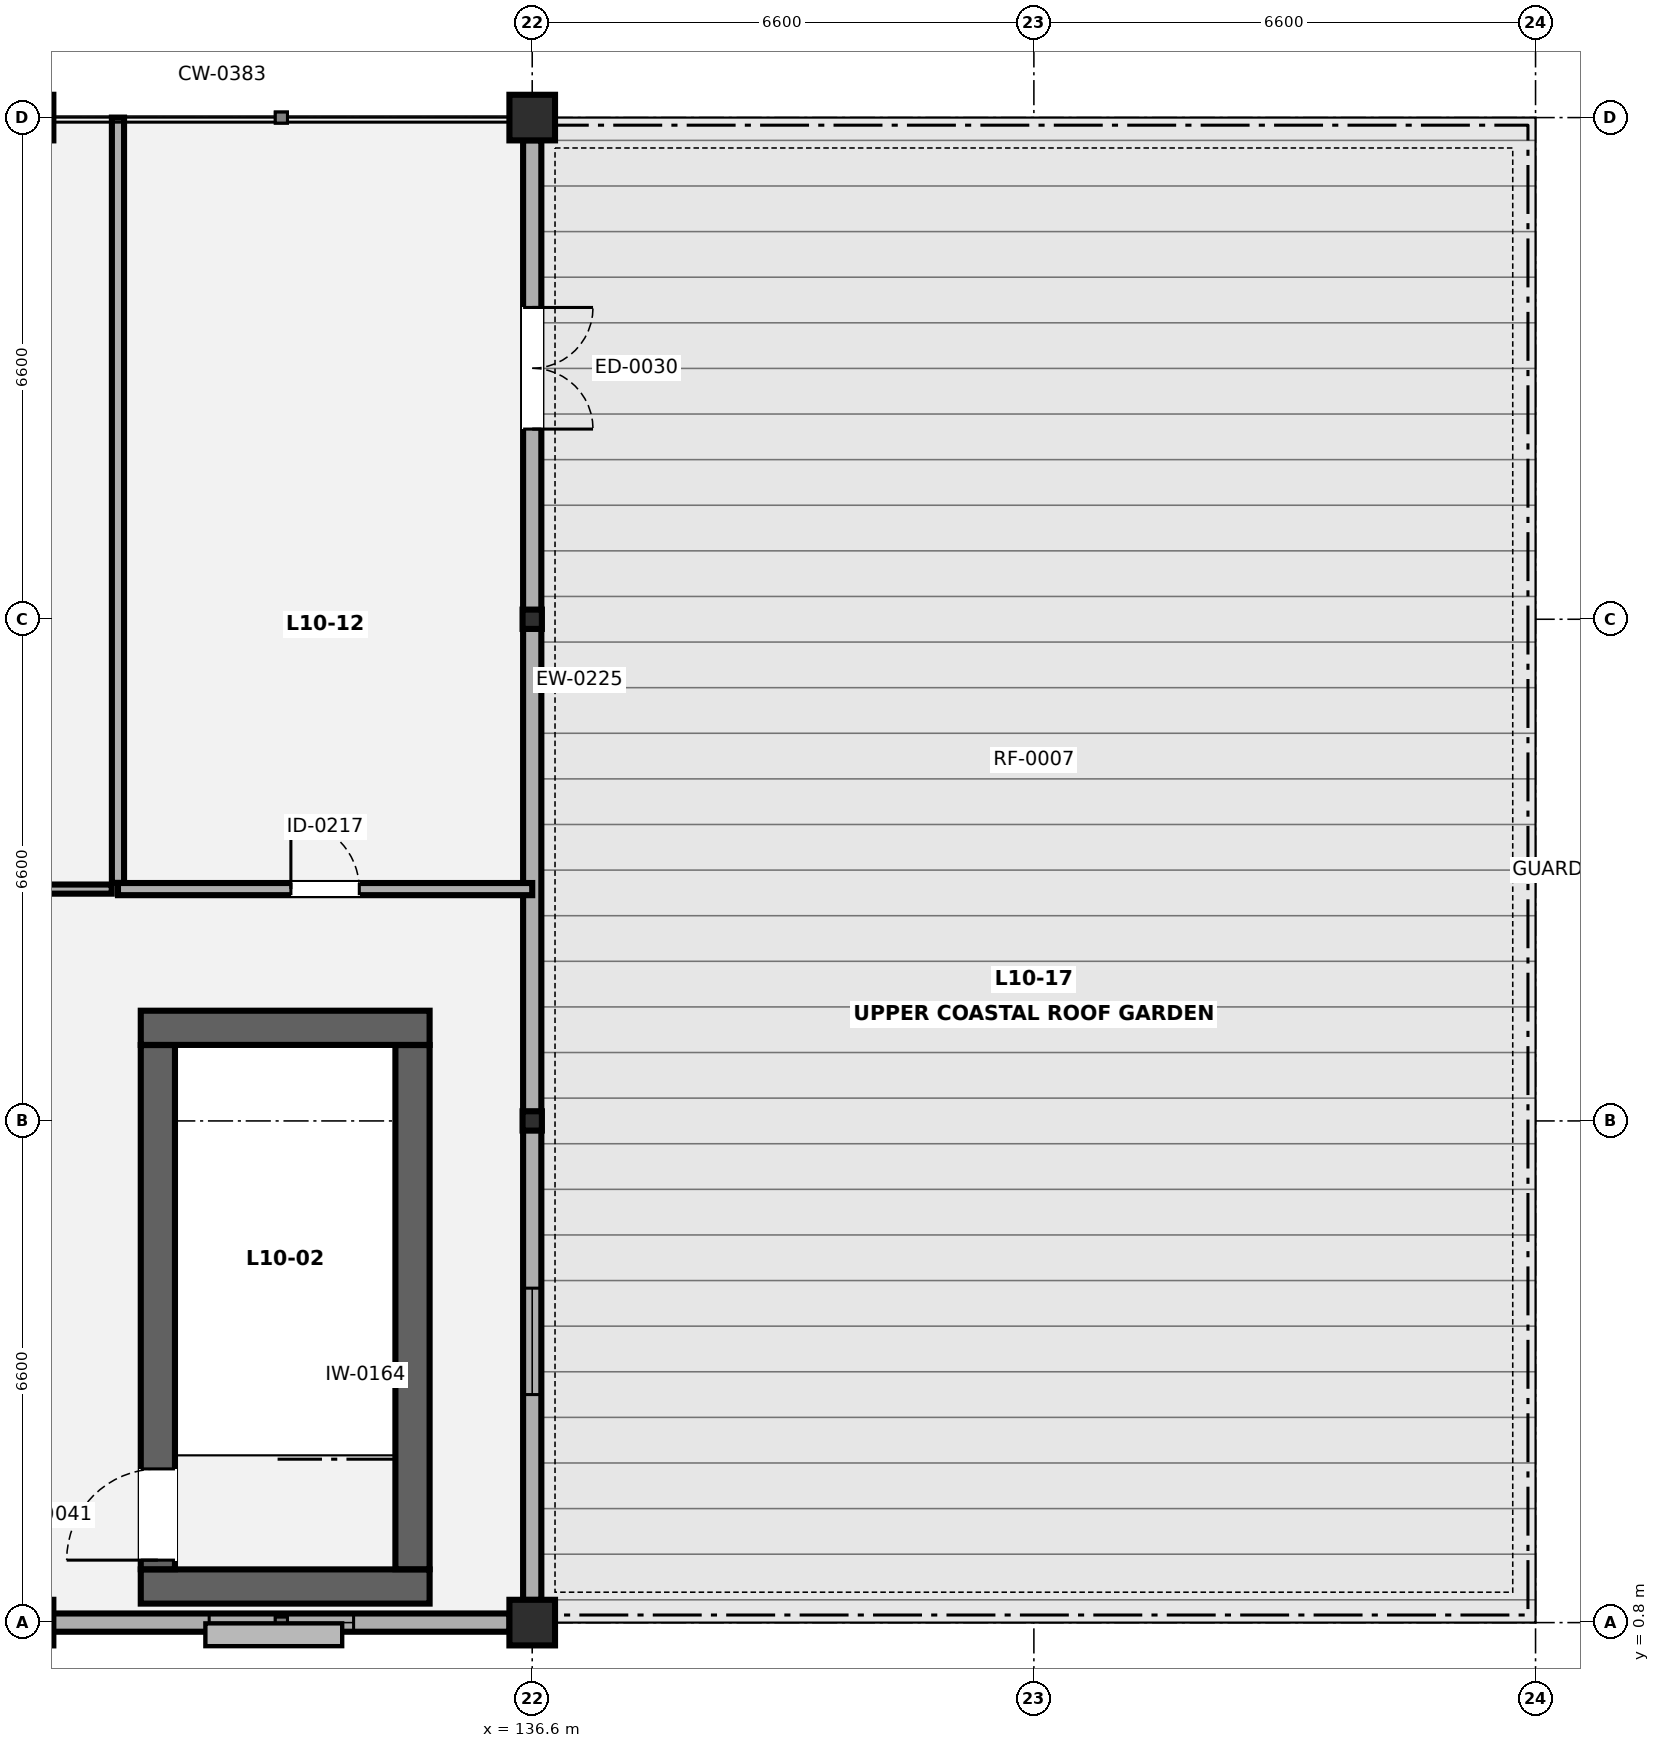
"""IFC4 building model, lengths in metres.
Left out: names, types, materials, properties, quantities, classifications, styles, units other than length and angle.
Written with IfcOpenShell. Run it as: python <this file> out.ifc"""

import sys

from ifc_helpers import new_model, si_unit, direction, frame, frame_2d, origin, origin_2d, place, context, subcontext, project, spatial, rectangle, circle, i_section, extrude, element, fill, save


model = new_model("IFC4")
c1 = context("Model", 3, precision=1e-05, world=origin(), true_north=direction((0.0, 1.0)))
c2 = subcontext(c1, "Body", "Model", "MODEL_VIEW")
j1 = project(units=[si_unit("LENGTHUNIT", "METRE"), si_unit("PLANEANGLEUNIT", "RADIAN")], contexts=[c1])
p1 = place(None, origin())
s1 = spatial("IfcSite", under=j1, at=p1, CompositionType="ELEMENT")
p2 = place(p1, origin())
s2 = spatial("IfcBuilding", under=s1, at=p2, CompositionType="ELEMENT")
p3 = place(p2, frame((0.0, 0.0, 42.0)))
s3 = spatial("IfcBuildingStorey", under=s2, at=p3, CompositionType="ELEMENT", Elevation=42.0)
for number, where, z_axis, x_axis in (
    (1, (130.0, 0.8, 0.0), (0.0, 0.0, 1.0), (1.0, 0.0, 0.0)),
    (2, (130.0, 20.6, 0.0), (0.0, 0.0, 1.0), (1.0, 0.0, 0.0)),
    (3, (136.6, 0.8, 0.0), (0.0, 0.0, 1.0), (1.0, 0.0, 0.0)),
):
    element("IfcColumn", number, at=place(p3, frame(where, z_axis=z_axis, x_axis=x_axis)), inside=s3, PredefinedType="PILASTER", context=c2, shape_type="SweptSolid", body=[
        extrude(circle(Radius=0.3, at=origin_2d()), origin(), (0.0, 0.0, 1.0), 3.85),
    ])
for number, where, z_axis, x_axis in (
    (4, (136.6, 7.4, 0.0), (0.0, 0.0, 1.0), (1.0, 0.0, 0.0)),
    (5, (136.6, 14.0, 0.0), (0.0, 0.0, 1.0), (1.0, 0.0, 0.0)),
):
    element("IfcColumn", number, at=place(p3, frame(where, z_axis=z_axis, x_axis=x_axis)), inside=s3, PredefinedType="COLUMN", context=c2, shape_type="SweptSolid", body=[
        extrude(i_section(OverallWidth=0.254, OverallDepth=0.254, WebThickness=0.009, FlangeThickness=0.014, FilletRadius=0.014, at=origin_2d()), origin(), (0.0, 0.0, 1.0), 3.85),
    ])
p4 = place(p3, frame((136.6, 20.6, 0.0), z_axis=(0.0, 0.0, 1.0), x_axis=(1.0, 0.0, 0.0)))
e6 = element("IfcColumn", 6, at=p4, inside=s3, PredefinedType="PILASTER", context=c2, shape_type="SweptSolid", body=[
    extrude(circle(Radius=0.3, at=origin_2d()), origin(), (0.0, 0.0, 1.0), 3.85),
])
p5 = place(p3, frame((136.6, 20.302, 0.0), z_axis=(0.0, 0.0, 1.0), x_axis=(0.0, -1.0, 0.0)))
e7 = element("IfcWall", 7, at=p5, inside=s3, PredefinedType="SOLIDWALL", context=c2, shape_type="SweptSolid", body=[
    extrude(rectangle(XDim=19.204, YDim=0.24, at=frame_2d((9.602, 0.0))), origin(), (0.0, 0.0, 1.0), 3.022),
])
p6 = place(p5, frame((2.2, 0.0, 0.0)))
e8 = element("IfcOpeningElement", 8, at=p6, cuts=e7, PredefinedType="OPENING", context=c2, shape_type="SweptSolid", body=[
    extrude(rectangle(XDim=1.6, YDim=2.15, at=frame_2d((0.8, 1.075))), frame((0.0, 0.13, 0.0), z_axis=(0.0, -1.0, 0.0), x_axis=(1.0, 0.0, 0.0)), (0.0, 0.0, 1.0), 0.26),
])
p7 = place(p5, frame((15.102, 0.0, 0.85)))
e9 = element("IfcOpeningElement", 9, at=p7, cuts=e7, PredefinedType="OPENING", context=c2, shape_type="SweptSolid", body=[
    extrude(rectangle(XDim=1.4, YDim=1.4, at=frame_2d((0.7, 0.7))), frame((0.0, 0.13, 0.0), z_axis=(0.0, -1.0, 0.0), x_axis=(1.0, 0.0, 0.0)), (0.0, 0.0, 1.0), 0.26),
])
p8 = place(p3, frame((136.302, 0.8, 0.0), z_axis=(0.0, 0.0, 1.0), x_axis=(-1.0, 0.0, 0.0)))
e10 = element("IfcWall", 10, at=p8, inside=s3, PredefinedType="SOLIDWALL", context=c2, shape_type="SweptSolid", body=[
    extrude(rectangle(XDim=32.404, YDim=0.24, at=frame_2d((16.202, 0.0))), origin(), (0.0, 0.0, 1.0), 3.155),
])
p9 = place(p8, frame((28.177, 0.0, 0.85)))
e11 = element("IfcOpeningElement", 11, at=p9, cuts=e10, PredefinedType="OPENING", context=c2, shape_type="SweptSolid", body=[
    extrude(rectangle(XDim=2.45, YDim=1.4, at=frame_2d((1.225, 0.7))), frame((0.0, 0.13, 0.0), z_axis=(0.0, -1.0, 0.0), x_axis=(1.0, 0.0, 0.0)), (0.0, 0.0, 1.0), 0.26),
])
p10 = place(p8, frame((22.202, 0.0, 0.85)))
e12 = element("IfcOpeningElement", 12, at=p10, cuts=e10, PredefinedType="OPENING", context=c2, shape_type="SweptSolid", body=[
    extrude(rectangle(XDim=1.2, YDim=1.25, at=frame_2d((0.6, 0.625))), frame((0.0, 0.13, 0.0), z_axis=(0.0, -1.0, 0.0), x_axis=(1.0, 0.0, 0.0)), (0.0, 0.0, 1.0), 0.26),
])
p11 = place(p8, frame((15.477, 0.0, 0.85)))
e13 = element("IfcOpeningElement", 13, at=p11, cuts=e10, PredefinedType="OPENING", context=c2, shape_type="SweptSolid", body=[
    extrude(rectangle(XDim=1.45, YDim=1.25, at=frame_2d((0.725, 0.625))), frame((0.0, 0.13, 0.0), z_axis=(0.0, -1.0, 0.0), x_axis=(1.0, 0.0, 0.0)), (0.0, 0.0, 1.0), 0.26),
])
p12 = place(p8, frame((8.777, 0.0, 0.85)))
e14 = element("IfcOpeningElement", 14, at=p12, cuts=e10, PredefinedType="OPENING", context=c2, shape_type="SweptSolid", body=[
    extrude(rectangle(XDim=1.65, YDim=1.25, at=frame_2d((0.825, 0.625))), frame((0.0, 0.13, 0.0), z_axis=(0.0, -1.0, 0.0), x_axis=(1.0, 0.0, 0.0)), (0.0, 0.0, 1.0), 0.26),
])
p13 = place(p8, frame((2.052, 0.0, 0.85)))
e15 = element("IfcOpeningElement", 15, at=p13, cuts=e10, PredefinedType="OPENING", context=c2, shape_type="SweptSolid", body=[
    extrude(rectangle(XDim=1.9, YDim=1.25, at=frame_2d((0.95, 0.625))), frame((0.0, 0.13, 0.0), z_axis=(0.0, -1.0, 0.0), x_axis=(1.0, 0.0, 0.0)), (0.0, 0.0, 1.0), 0.26),
])
for number, where, z_axis, x_axis in (
    (16, (131.45, 1.275, 0.0), (0.0, 0.0, 1.0), (1.0, 0.0, 0.0)),
    (17, (131.45, 8.625, 0.0), (0.0, 0.0, 1.0), (1.0, 0.0, 0.0)),
):
    element("IfcWall", number, at=place(p3, frame(where, z_axis=z_axis, x_axis=x_axis)), inside=s3, PredefinedType="SHEAR", context=c2, shape_type="SweptSolid", body=[
        extrude(rectangle(XDim=3.8, YDim=0.45, at=frame_2d((1.9, 0.0))), origin(), (0.0, 0.0, 1.0), 3.67),
    ])
p14 = place(p3, frame((131.675, 1.502, 0.0), z_axis=(0.0, 0.0, 1.0), x_axis=(0.0, 1.0, 0.0)))
e18 = element("IfcWall", 18, at=p14, inside=s3, PredefinedType="SHEAR", context=c2, shape_type="SweptSolid", body=[
    extrude(rectangle(XDim=6.896, YDim=0.45, at=frame_2d((3.448, 0.0))), origin(), (0.0, 0.0, 1.0), 3.67),
])
p15 = place(p14, frame((0.12, 0.0, 0.0)))
e19 = element("IfcOpeningElement", 19, at=p15, cuts=e18, PredefinedType="OPENING", context=c2, shape_type="SweptSolid", body=[
    extrude(rectangle(XDim=1.2, YDim=2.15, at=frame_2d((0.6, 1.075))), frame((0.0, 0.235, 0.0), z_axis=(0.0, -1.0, 0.0), x_axis=(1.0, 0.0, 0.0)), (0.0, 0.0, 1.0), 0.47),
])
p16 = place(p3, frame((135.025, 1.502, 0.0), z_axis=(0.0, 0.0, 1.0), x_axis=(0.0, 1.0, 0.0)))
e20 = element("IfcWall", 20, at=p16, inside=s3, PredefinedType="SHEAR", context=c2, shape_type="SweptSolid", body=[
    extrude(rectangle(XDim=6.896, YDim=0.45, at=frame_2d((3.448, 0.0))), origin(), (0.0, 0.0, 1.0), 3.67),
])
p17 = place(p3, frame((131.15, 10.45, 0.0), z_axis=(0.0, 0.0, 1.0), x_axis=(1.0, 0.0, 0.0)))
e21 = element("IfcWall", 21, at=p17, inside=s3, PredefinedType="PARTITIONING", context=c2, shape_type="SweptSolid", body=[
    extrude(rectangle(XDim=5.45, YDim=0.16, at=frame_2d((2.725, 0.0))), origin(), (0.0, 0.0, 1.0), 3.196),
])
p18 = place(p17, frame((2.275, 0.0, 0.0)))
e22 = element("IfcOpeningElement", 22, at=p18, cuts=e21, PredefinedType="OPENING", context=c2, shape_type="SweptSolid", body=[
    extrude(rectangle(XDim=0.9, YDim=2.1, at=frame_2d((0.45, 1.05))), frame((0.0, 0.09, 0.0), z_axis=(0.0, -1.0, 0.0), x_axis=(1.0, 0.0, 0.0)), (0.0, 0.0, 1.0), 0.18),
])
p19 = place(p3, frame((131.15, 10.532, 0.0), z_axis=(0.0, 0.0, 1.0), x_axis=(0.0, 1.0, 0.0)))
e23 = element("IfcWall", 23, at=p19, inside=s3, PredefinedType="PARTITIONING", context=c2, shape_type="SweptSolid", body=[
    extrude(rectangle(XDim=10.068, YDim=0.16, at=frame_2d((5.034, 0.0))), origin(), (0.0, 0.0, 1.0), 3.67),
])
p20 = place(p3, frame((125.262, 10.45, 0.0), z_axis=(0.0, 0.0, 1.0), x_axis=(1.0, 0.0, 0.0)))
e24 = element("IfcWall", 24, at=p20, inside=s3, PredefinedType="PARTITIONING", context=c2, shape_type="SweptSolid", body=[
    extrude(rectangle(XDim=5.806, YDim=0.12, at=frame_2d((2.903, 0.0))), origin(), (0.0, 0.0, 1.0), 3.196),
])
p21 = place(p20, frame((2.178, 0.0, 0.0)))
e25 = element("IfcOpeningElement", 25, at=p21, cuts=e24, PredefinedType="OPENING", context=c2, shape_type="SweptSolid", body=[
    extrude(rectangle(XDim=1.45, YDim=2.12, at=frame_2d((0.725, 1.06))), frame((0.0, 0.07, 0.0), z_axis=(0.0, -1.0, 0.0), x_axis=(1.0, 0.0, 0.0)), (0.0, 0.0, 1.0), 0.14),
])
p22 = place(p6, origin())
e26 = element("IfcDoor", 26, at=p22, inside=s3, OperationType="DOUBLE_DOOR_SINGLE_SWING", PredefinedType="DOOR", context=c2, shape_type="SweptSolid", body=[
    extrude(rectangle(XDim=1.6, YDim=2.15, at=frame_2d((0.8, 1.075))), frame((0.0, 0.025, 0.0), z_axis=(0.0, -1.0, 0.0), x_axis=(1.0, 0.0, 0.0)), (0.0, 0.0, 1.0), 0.05),
])
fill(e8, e26)
p23 = place(p7, origin())
e27 = element("IfcWindow", 27, at=p23, inside=s3, PartitioningType="SINGLE_PANEL", PredefinedType="WINDOW", context=c2, shape_type="SweptSolid", body=[
    extrude(rectangle(XDim=1.4, YDim=1.4, at=frame_2d((0.7, 0.7))), frame((0.0, 0.03, 0.0), z_axis=(0.0, -1.0, 0.0), x_axis=(1.0, 0.0, 0.0)), (0.0, 0.0, 1.0), 0.06),
])
fill(e9, e27)
p24 = place(p13, origin())
e28 = element("IfcWindow", 28, at=p24, inside=s3, PartitioningType="SINGLE_PANEL", PredefinedType="WINDOW", context=c2, shape_type="SweptSolid", body=[
    extrude(rectangle(XDim=1.9, YDim=1.25, at=frame_2d((0.95, 0.625))), frame((0.0, 0.03, 0.0), z_axis=(0.0, -1.0, 0.0), x_axis=(1.0, 0.0, 0.0)), (0.0, 0.0, 1.0), 0.06),
])
fill(e15, e28)
p25 = place(p15, origin())
e29 = element("IfcDoor", 29, at=p25, inside=s3, OperationType="SINGLE_SWING_LEFT", PredefinedType="DOOR", context=c2, shape_type="SweptSolid", body=[
    extrude(rectangle(XDim=1.2, YDim=2.15, at=frame_2d((0.6, 1.075))), frame((0.0, 0.025, 0.0), z_axis=(0.0, -1.0, 0.0), x_axis=(1.0, 0.0, 0.0)), (0.0, 0.0, 1.0), 0.05),
])
fill(e19, e29)
p26 = place(p18, origin())
e30 = element("IfcDoor", 30, at=p26, inside=s3, OperationType="SINGLE_SWING_LEFT", PredefinedType="DOOR", context=c2, shape_type="SweptSolid", body=[
    extrude(rectangle(XDim=0.9, YDim=2.1, at=frame_2d((0.45, 1.05))), frame((0.0, 0.025, 0.0), z_axis=(0.0, -1.0, 0.0), x_axis=(1.0, 0.0, 0.0)), (0.0, 0.0, 1.0), 0.05),
])
fill(e22, e30)
save(model, sys.argv[1])
